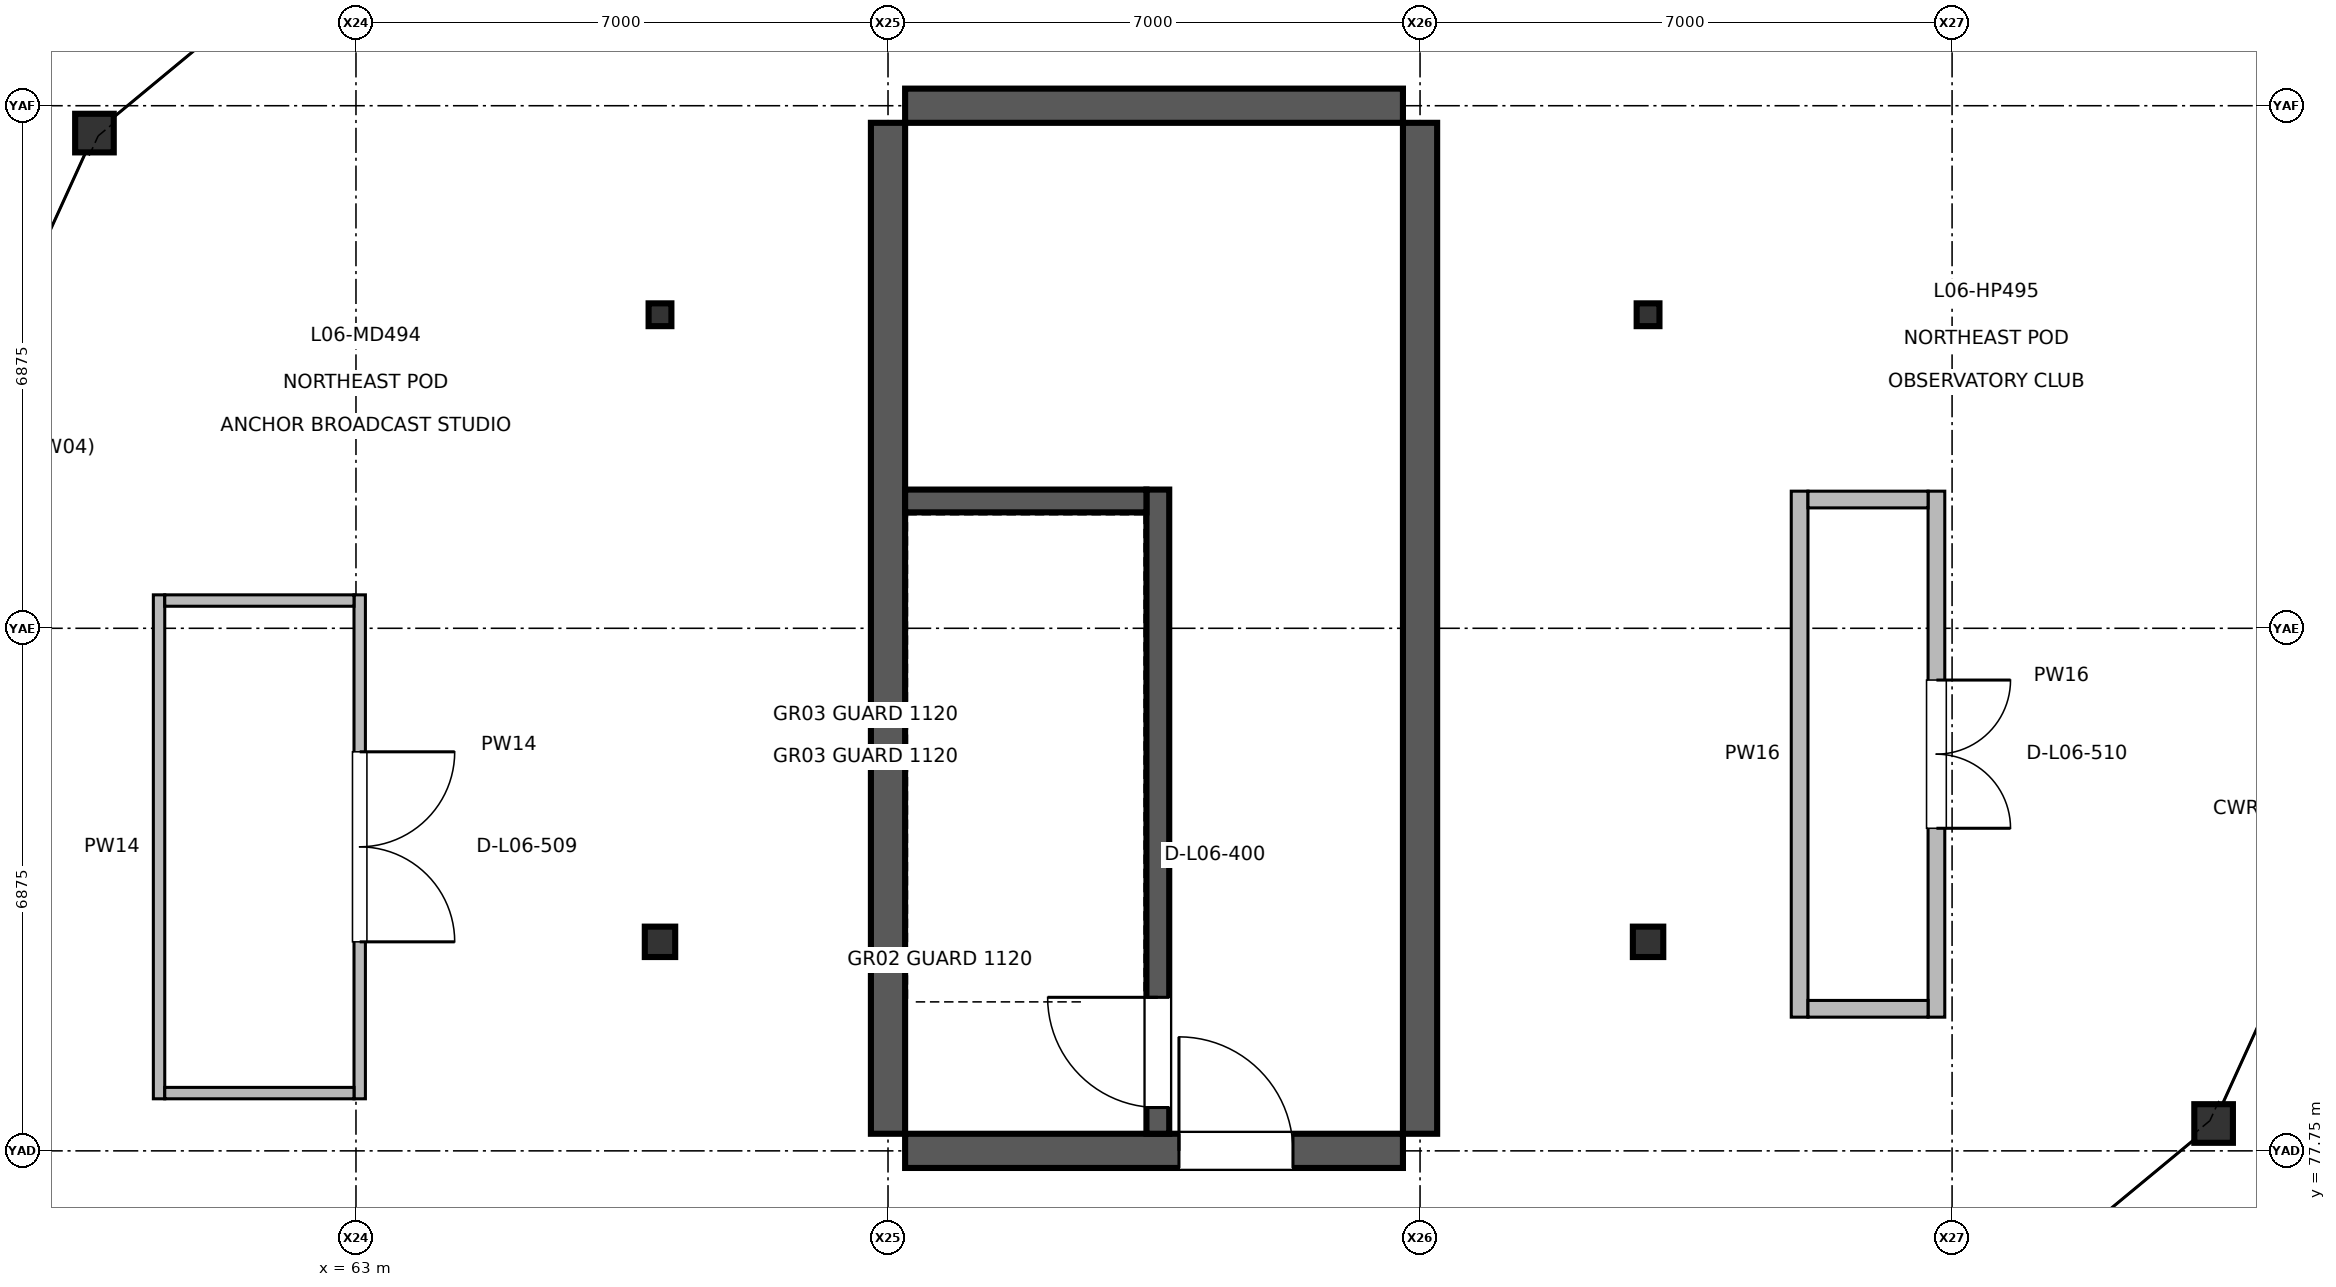
"""IFC4 building model, lengths in metres.
Left out: names, types, materials, properties, quantities, classifications, styles, units other than length and angle.
Written with IfcOpenShell. Run it as: python <this file> out.ifc"""

import sys

from ifc_helpers import new_model, si_unit, direction, frame, frame_2d, origin, origin_2d, place, context, subcontext, project, spatial, rectangle, hollow_circle, i_section, extrude, element, fill, save


model = new_model("IFC4")
c1 = context("Model", 3, precision=1e-05, world=origin(), true_north=direction((0.0, 1.0)))
c2 = subcontext(c1, "Body", "Model", "MODEL_VIEW")
j1 = project(units=[si_unit("LENGTHUNIT", "METRE"), si_unit("PLANEANGLEUNIT", "RADIAN")], contexts=[c1])
p1 = place(None, origin())
s1 = spatial("IfcSite", under=j1, at=p1, CompositionType="ELEMENT")
p2 = place(p1, origin())
s2 = spatial("IfcBuilding", under=s1, at=p2, CompositionType="ELEMENT")
p3 = place(p2, frame((0.0, 0.0, 26.4)))
s3 = spatial("IfcBuildingStorey", under=s2, at=p3, CompositionType="ELEMENT", Elevation=26.4)
for number, where, z_axis, x_axis in (
    (1, (67.0, 80.5, 0.0), (0.0, 0.0, 1.0), (1.0, 0.0, 0.0)),
    (2, (80.0, 80.5, 0.0), (0.0, 0.0, 1.0), (1.0, 0.0, 0.0)),
):
    element("IfcColumn", number, at=place(p3, frame(where, z_axis=z_axis, x_axis=x_axis)), inside=s3, PredefinedType="COLUMN", context=c2, shape_type="SweptSolid", body=[
        extrude(i_section(OverallWidth=0.4, OverallDepth=0.4, WebThickness=0.013, FlangeThickness=0.021, at=origin_2d()), origin(), (0.0, 0.0, 1.0), 4.945),
    ])
for number, where, z_axis, x_axis in (
    (3, (67.0, 88.75, 0.0), (0.0, 0.0, 1.0), (1.0, 0.0, 0.0)),
    (4, (80.0, 88.75, 0.0), (0.0, 0.0, 1.0), (1.0, 0.0, 0.0)),
):
    element("IfcColumn", number, at=place(p3, frame(where, z_axis=z_axis, x_axis=x_axis)), inside=s3, PredefinedType="COLUMN", context=c2, shape_type="SweptSolid", body=[
        extrude(i_section(OverallWidth=0.3, OverallDepth=0.3, WebThickness=0.01, FlangeThickness=0.015, at=origin_2d()), origin(), (0.0, 0.0, 1.0), 4.945),
    ])
for number, where, z_axis, x_axis in (
    (5, (59.559, 91.14, 0.0), (0.0, 0.0, 1.0), (1.0, 0.0, 0.0)),
    (6, (87.441, 78.11, 0.0), (0.0, 0.0, 1.0), (1.0, 0.0, 0.0)),
):
    element("IfcColumn", number, at=place(p3, frame(where, z_axis=z_axis, x_axis=x_axis)), inside=s3, PredefinedType="COLUMN", context=c2, shape_type="SweptSolid", body=[
        extrude(hollow_circle(Radius=0.254, WallThickness=0.025, at=origin_2d()), origin(), (0.0, 0.0, 1.0), 4.945),
    ])
for number, where, z_axis, x_axis in (
    (7, (70.0, 77.975, 0.0), (0.0, 0.0, 1.0), (0.0, 1.0, 0.0)),
    (8, (77.0, 77.975, 0.0), (0.0, 0.0, 1.0), (0.0, 1.0, 0.0)),
):
    element("IfcWall", number, at=place(p3, frame(where, z_axis=z_axis, x_axis=x_axis)), inside=s3, PredefinedType="SHEAR", context=c2, shape_type="SweptSolid", body=[
        extrude(rectangle(XDim=13.3, YDim=0.45, at=frame_2d((6.65, 0.0))), origin(), (0.0, 0.0, 1.0), 4.945),
    ])
p4 = place(p3, frame((70.225, 77.75, 0.0), z_axis=(0.0, 0.0, 1.0), x_axis=(1.0, 0.0, 0.0)))
e9 = element("IfcWall", 9, at=p4, inside=s3, PredefinedType="SHEAR", context=c2, shape_type="SweptSolid", body=[
    extrude(rectangle(XDim=6.55, YDim=0.45, at=frame_2d((3.275, 0.0))), origin(), (0.0, 0.0, 1.0), 4.945),
])
p5 = place(p4, frame((3.603, 0.0, 0.0)))
e10 = element("IfcOpeningElement", 10, at=p5, cuts=e9, PredefinedType="OPENING", context=c2, shape_type="SweptSolid", body=[
    extrude(rectangle(XDim=1.5, YDim=2.2, at=frame_2d((0.75, 1.1))), frame((0.0, 0.235, 0.0), z_axis=(0.0, -1.0, 0.0), x_axis=(1.0, 0.0, 0.0)), (0.0, 0.0, 1.0), 0.47),
])
p6 = place(p3, frame((70.225, 91.5, 0.0), z_axis=(0.0, 0.0, 1.0), x_axis=(1.0, 0.0, 0.0)))
e11 = element("IfcWall", 11, at=p6, inside=s3, PredefinedType="SHEAR", context=c2, shape_type="SweptSolid", body=[
    extrude(rectangle(XDim=6.55, YDim=0.45, at=frame_2d((3.275, 0.0))), origin(), (0.0, 0.0, 1.0), 4.945),
])
p7 = place(p3, frame((73.55, 77.975, 0.0), z_axis=(0.0, 0.0, 1.0), x_axis=(0.0, 1.0, 0.0)))
e12 = element("IfcWall", 12, at=p7, inside=s3, PredefinedType="SHEAR", context=c2, shape_type="SweptSolid", body=[
    extrude(rectangle(XDim=8.475, YDim=0.3, at=frame_2d((4.237, 0.0))), origin(), (0.0, 0.0, 1.0), 4.945),
])
p8 = place(p7, frame((0.345, 0.0, 0.0)))
e13 = element("IfcOpeningElement", 13, at=p8, cuts=e12, PredefinedType="OPENING", context=c2, shape_type="SweptSolid", body=[
    extrude(rectangle(XDim=1.45, YDim=2.2, at=frame_2d((0.725, 1.1))), frame((0.0, 0.16, 0.0), z_axis=(0.0, -1.0, 0.0), x_axis=(1.0, 0.0, 0.0)), (0.0, 0.0, 1.0), 0.32),
])
p9 = place(p3, frame((63.049, 85.065, 0.0), z_axis=(0.0, 0.0, 1.0), x_axis=(0.0, -1.0, 0.0)))
e14 = element("IfcWall", 14, at=p9, inside=s3, PredefinedType="PARTITIONING", context=c2, shape_type="SweptSolid", body=[
    extrude(rectangle(XDim=6.63, YDim=0.15, at=frame_2d((3.315, 0.0))), origin(), (0.0, 0.0, 1.0), 4.22),
])
p10 = place(p9, frame((2.065, 0.0, 0.0)))
e15 = element("IfcOpeningElement", 15, at=p10, cuts=e14, PredefinedType="OPENING", context=c2, shape_type="SweptSolid", body=[
    extrude(rectangle(XDim=2.5, YDim=2.5, at=frame_2d((1.25, 1.25))), frame((0.0, 0.085, 0.0), z_axis=(0.0, -1.0, 0.0), x_axis=(1.0, 0.0, 0.0)), (0.0, 0.0, 1.0), 0.17),
])
p11 = place(p3, frame((83.794, 86.429, 0.0), z_axis=(0.0, 0.0, 1.0), x_axis=(0.0, -1.0, 0.0)))
e16 = element("IfcWall", 16, at=p11, inside=s3, PredefinedType="PARTITIONING", context=c2, shape_type="SweptSolid", body=[
    extrude(rectangle(XDim=6.92, YDim=0.22, at=frame_2d((3.46, 0.0))), origin(), (0.0, 0.0, 1.0), 4.22),
])
p12 = place(p11, frame((2.485, 0.0, 0.0)))
e17 = element("IfcOpeningElement", 17, at=p12, cuts=e16, PredefinedType="OPENING", context=c2, shape_type="SweptSolid", body=[
    extrude(rectangle(XDim=1.95, YDim=2.35, at=frame_2d((0.975, 1.175))), frame((0.0, 0.12, 0.0), z_axis=(0.0, -1.0, 0.0), x_axis=(1.0, 0.0, 0.0)), (0.0, 0.0, 1.0), 0.24),
])
p13 = place(p3, frame((60.409, 78.435, 0.0), z_axis=(0.0, 0.0, 1.0), x_axis=(0.0, 1.0, 0.0)))
e18 = element("IfcWall", 18, at=p13, inside=s3, PredefinedType="PARTITIONING", context=c2, shape_type="SweptSolid", body=[
    extrude(rectangle(XDim=6.63, YDim=0.15, at=frame_2d((3.315, 0.0))), origin(), (0.0, 0.0, 1.0), 4.22),
])
for number, where, z_axis, x_axis in (
    (19, (60.484, 78.51, 0.0), (0.0, 0.0, 1.0), (1.0, 0.0, 0.0)),
    (20, (60.484, 84.99, 0.0), (0.0, 0.0, 1.0), (1.0, 0.0, 0.0)),
):
    element("IfcWall", number, at=place(p3, frame(where, z_axis=z_axis, x_axis=x_axis)), inside=s3, PredefinedType="PARTITIONING", context=c2, shape_type="SweptSolid", body=[
        extrude(rectangle(XDim=2.49, YDim=0.15, at=frame_2d((1.245, 0.0))), origin(), (0.0, 0.0, 1.0), 4.22),
    ])
p14 = place(p3, frame((81.994, 79.509, 0.0), z_axis=(0.0, 0.0, 1.0), x_axis=(0.0, 1.0, 0.0)))
e21 = element("IfcWall", 21, at=p14, inside=s3, PredefinedType="PARTITIONING", context=c2, shape_type="SweptSolid", body=[
    extrude(rectangle(XDim=6.92, YDim=0.22, at=frame_2d((3.46, 0.0))), origin(), (0.0, 0.0, 1.0), 4.22),
])
for number, where, z_axis, x_axis in (
    (22, (82.104, 79.619, 0.0), (0.0, 0.0, 1.0), (1.0, 0.0, 0.0)),
    (23, (82.104, 86.319, 0.0), (0.0, 0.0, 1.0), (1.0, 0.0, 0.0)),
):
    element("IfcWall", number, at=place(p3, frame(where, z_axis=z_axis, x_axis=x_axis)), inside=s3, PredefinedType="PARTITIONING", context=c2, shape_type="SweptSolid", body=[
        extrude(rectangle(XDim=1.58, YDim=0.22, at=frame_2d((0.79, 0.0))), origin(), (0.0, 0.0, 1.0), 4.22),
    ])
p15 = place(p3, frame((70.225, 86.3, 0.0), z_axis=(0.0, 0.0, 1.0), x_axis=(1.0, 0.0, 0.0)))
e24 = element("IfcWall", 24, at=p15, inside=s3, PredefinedType="SHEAR", context=c2, shape_type="SweptSolid", body=[
    extrude(rectangle(XDim=3.175, YDim=0.3, at=frame_2d((1.587, 0.0))), origin(), (0.0, 0.0, 1.0), 4.945),
])
p16 = place(p5, origin())
e25 = element("IfcDoor", 25, at=p16, inside=s3, OperationType="SINGLE_SWING_LEFT", PredefinedType="DOOR", context=c2, shape_type="SweptSolid", body=[
    extrude(rectangle(XDim=1.5, YDim=2.2, at=frame_2d((0.75, 1.1))), frame((0.0, 0.025, 0.0), z_axis=(0.0, -1.0, 0.0), x_axis=(1.0, 0.0, 0.0)), (0.0, 0.0, 1.0), 0.05),
])
fill(e10, e25)
p17 = place(p8, origin())
e26 = element("IfcDoor", 26, at=p17, inside=s3, OperationType="SINGLE_SWING_RIGHT", PredefinedType="DOOR", context=c2, shape_type="SweptSolid", body=[
    extrude(rectangle(XDim=1.45, YDim=2.2, at=frame_2d((0.725, 1.1))), frame((0.0, 0.025, 0.0), z_axis=(0.0, -1.0, 0.0), x_axis=(1.0, 0.0, 0.0)), (0.0, 0.0, 1.0), 0.05),
])
fill(e13, e26)
p18 = place(p10, origin())
e27 = element("IfcDoor", 27, at=p18, inside=s3, OperationType="DOUBLE_DOOR_SINGLE_SWING", PredefinedType="DOOR", context=c2, shape_type="SweptSolid", body=[
    extrude(rectangle(XDim=2.5, YDim=2.5, at=frame_2d((1.25, 1.25))), frame((0.0, 0.025, 0.0), z_axis=(0.0, -1.0, 0.0), x_axis=(1.0, 0.0, 0.0)), (0.0, 0.0, 1.0), 0.05),
])
fill(e15, e27)
p19 = place(p12, origin())
e28 = element("IfcDoor", 28, at=p19, inside=s3, OperationType="DOUBLE_DOOR_SINGLE_SWING", PredefinedType="DOOR", context=c2, shape_type="SweptSolid", body=[
    extrude(rectangle(XDim=1.95, YDim=2.35, at=frame_2d((0.975, 1.175))), frame((0.0, 0.025, 0.0), z_axis=(0.0, -1.0, 0.0), x_axis=(1.0, 0.0, 0.0)), (0.0, 0.0, 1.0), 0.05),
])
fill(e17, e28)
save(model, sys.argv[1])
